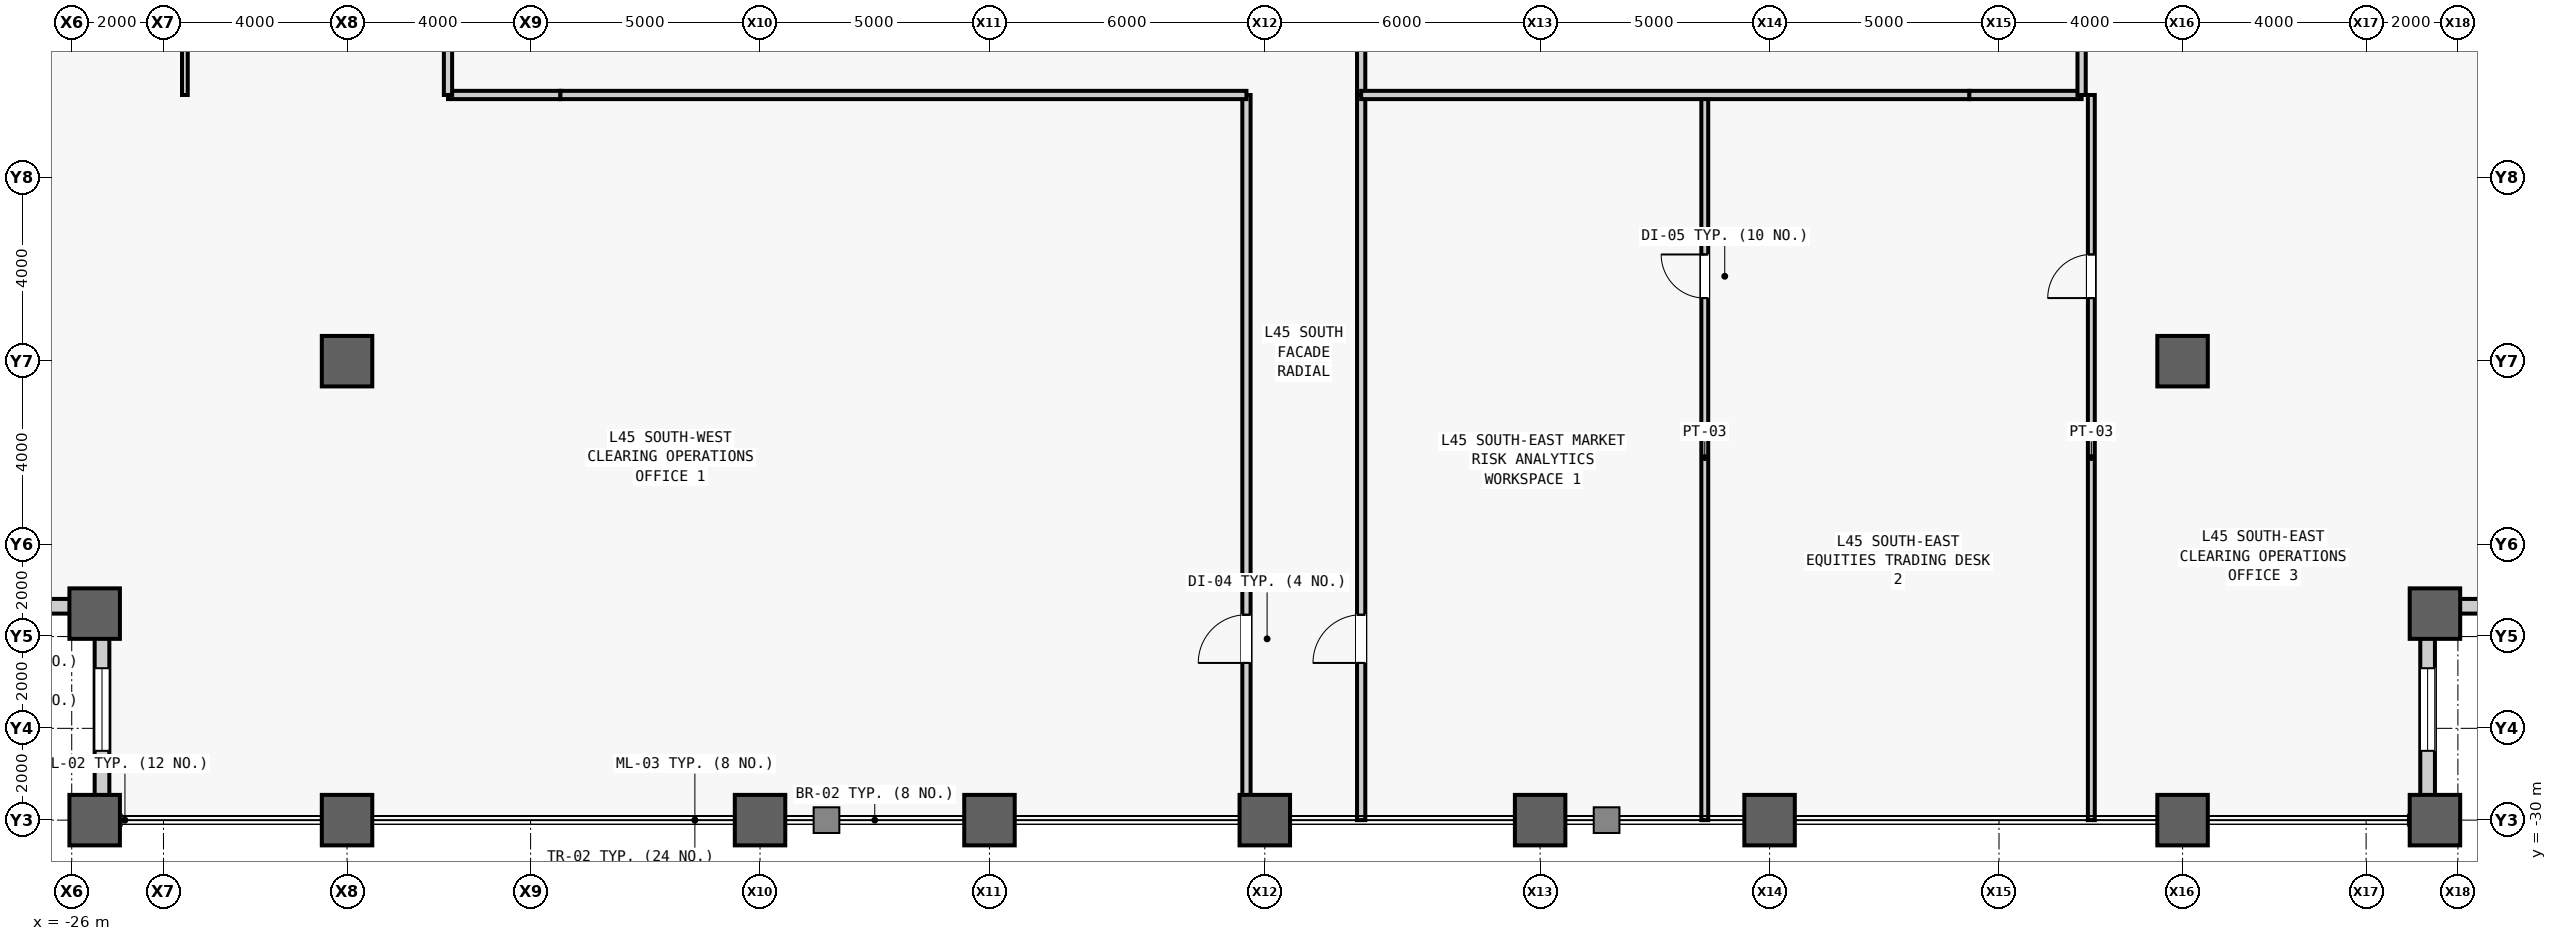
"""IFC4 building model, lengths in metres.
Left out: names, types, materials, properties, quantities, classifications, styles, units other than length and angle.
Written with IfcOpenShell. Run it as: python <this file> out.ifc"""

import sys

from ifc_helpers import new_model, si_unit, direction, frame, frame_2d, origin, origin_2d, place, context, subcontext, project, spatial, rectangle, hollow_rectangle, extrude, source, transform, mapped, element, fill, save


model = new_model("IFC4")
c1 = context("Model", 3, precision=1e-05, world=origin(), true_north=direction((0.0, 1.0)))
c2 = subcontext(c1, "Body", "Model", "MODEL_VIEW")
j1 = project(units=[si_unit("LENGTHUNIT", "METRE"), si_unit("PLANEANGLEUNIT", "RADIAN")], contexts=[c1])
p1 = place(None, origin())
s1 = spatial("IfcSite", under=j1, at=p1, CompositionType="ELEMENT")
p2 = place(p1, origin())
s2 = spatial("IfcBuilding", under=s1, at=p2, CompositionType="ELEMENT")
p3 = place(p2, frame((0.0, 0.0, 195.1)))
s3 = spatial("IfcBuildingStorey", under=s2, at=p3, CompositionType="ELEMENT", Elevation=195.1)
m1 = source(origin(), c2, "Body", "SweptSolid", [
    extrude(hollow_rectangle(XDim=1.1, YDim=1.1, WallThickness=0.06, at=origin_2d()), origin(), (0.0, 0.0, 1.0), 4.0),
])
for number, where, z_axis, x_axis in (
    (1, (-25.5, -30.0, 0.0), (0.0, 0.0, 1.0), (1.0, 0.0, 0.0)),
    (2, (-25.5, -25.5, 0.0), (0.0, 0.0, 1.0), (1.0, 0.0, 0.0)),
    (3, (-20.0, -30.0, 0.0), (0.0, 0.0, 1.0), (1.0, 0.0, 0.0)),
    (4, (-20.0, -20.0, 0.0), (0.0, 0.0, 1.0), (1.0, 0.0, 0.0)),
    (5, (-11.0, -30.0, 0.0), (0.0, 0.0, 1.0), (1.0, 0.0, 0.0)),
    (6, (-6.0, -30.0, 0.0), (0.0, 0.0, 1.0), (1.0, 0.0, 0.0)),
    (7, (0.0, -30.0, 0.0), (0.0, 0.0, 1.0), (1.0, 0.0, 0.0)),
    (8, (6.0, -30.0, 0.0), (0.0, 0.0, 1.0), (1.0, 0.0, 0.0)),
    (9, (11.0, -30.0, 0.0), (0.0, 0.0, 1.0), (1.0, 0.0, 0.0)),
    (10, (20.0, -30.0, 0.0), (0.0, 0.0, 1.0), (1.0, 0.0, 0.0)),
    (11, (20.0, -20.0, 0.0), (0.0, 0.0, 1.0), (1.0, 0.0, 0.0)),
    (12, (25.5, -30.0, 0.0), (0.0, 0.0, 1.0), (1.0, 0.0, 0.0)),
    (13, (25.5, -25.5, 0.0), (0.0, 0.0, 1.0), (1.0, 0.0, 0.0)),
):
    element("IfcColumn", number, at=place(p3, frame(where, z_axis=z_axis, x_axis=x_axis)), inside=s3, PredefinedType="COLUMN", context=c2, shape_type="MappedRepresentation", body=[
        mapped(m1, transform((0.0, 0.0, 0.0), scale=1.0)),
    ])
m2 = source(origin(), c2, "Body", "SweptSolid", [
    extrude(rectangle(XDim=4.18, YDim=0.32, at=frame_2d((2.09, 0.0))), origin(), (0.0, 0.0, 1.0), 3.164),
])
p4 = place(p3, frame((-25.5, -25.34, 0.0), z_axis=(0.0, 0.0, 1.0), x_axis=(-1.0, 0.0, 0.0)))
e14 = element("IfcWall", 14, at=p4, inside=s3, PredefinedType="STANDARD", context=c2, shape_type="MappedRepresentation", body=[
    mapped(m2, transform((0.0, 0.0, 0.0), scale=1.0)),
])
m3 = source(origin(), c2, "Body", "SweptSolid", [
    extrude(rectangle(XDim=1.8, YDim=2.4, at=frame_2d((0.9, 1.2))), frame((0.0, 0.17, 0.0), z_axis=(0.0, -1.0, 0.0), x_axis=(1.0, 0.0, 0.0)), (0.0, 0.0, 1.0), 0.34),
])
p5 = place(p4, frame((1.19, 0.0, 0.5)))
e15 = element("IfcOpeningElement", 15, at=p5, cuts=e14, PredefinedType="OPENING", context=c2, shape_type="MappedRepresentation", body=[
    mapped(m3, transform((0.0, 0.0, 0.0), scale=1.0)),
])
p6 = place(p3, frame((-25.34, -29.68, 0.0), z_axis=(0.0, 0.0, 1.0), x_axis=(0.0, 1.0, 0.0)))
e16 = element("IfcWall", 16, at=p6, inside=s3, PredefinedType="STANDARD", context=c2, shape_type="MappedRepresentation", body=[
    mapped(m2, transform((0.0, 0.0, 0.0), scale=1.0)),
])
p7 = place(p6, frame((1.19, 0.0, 0.5)))
e17 = element("IfcOpeningElement", 17, at=p7, cuts=e16, PredefinedType="OPENING", context=c2, shape_type="MappedRepresentation", body=[
    mapped(m3, transform((0.0, 0.0, 0.0), scale=1.0)),
])
p8 = place(p3, frame((25.34, -29.68, 0.0), z_axis=(0.0, 0.0, 1.0), x_axis=(0.0, 1.0, 0.0)))
e18 = element("IfcWall", 18, at=p8, inside=s3, PredefinedType="STANDARD", context=c2, shape_type="MappedRepresentation", body=[
    mapped(m2, transform((0.0, 0.0, 0.0), scale=1.0)),
])
p9 = place(p8, frame((1.19, 0.0, 0.5)))
e19 = element("IfcOpeningElement", 19, at=p9, cuts=e18, PredefinedType="OPENING", context=c2, shape_type="MappedRepresentation", body=[
    mapped(m3, transform((0.0, 0.0, 0.0), scale=1.0)),
])
p10 = place(p3, frame((25.5, -25.34, 0.0), z_axis=(0.0, 0.0, 1.0), x_axis=(1.0, 0.0, 0.0)))
e20 = element("IfcWall", 20, at=p10, inside=s3, PredefinedType="STANDARD", context=c2, shape_type="MappedRepresentation", body=[
    mapped(m2, transform((0.0, 0.0, 0.0), scale=1.0)),
])
p11 = place(p10, frame((1.19, 0.0, 0.5)))
e21 = element("IfcOpeningElement", 21, at=p11, cuts=e20, PredefinedType="OPENING", context=c2, shape_type="MappedRepresentation", body=[
    mapped(m3, transform((0.0, 0.0, 0.0), scale=1.0)),
])
m4 = source(origin(), c2, "Body", "SweptSolid", [
    extrude(rectangle(XDim=2.45, YDim=0.18, at=frame_2d((1.225, 0.0))), origin(), (0.0, 0.0, 1.0), 3.78),
])
for number, where, z_axis, x_axis in (
    (22, (15.35, -14.2, 0.0), (0.0, 0.0, 1.0), (1.0, 0.0, 0.0)),
    (23, (-17.8, -14.2, 0.0), (0.0, 0.0, 1.0), (1.0, 0.0, 0.0)),
):
    element("IfcWall", number, at=place(p3, frame(where, z_axis=z_axis, x_axis=x_axis)), inside=s3, PredefinedType="PARTITIONING", context=c2, shape_type="MappedRepresentation", body=[
        mapped(m4, transform((0.0, 0.0, 0.0), scale=1.0)),
    ])
m5 = source(origin(), c2, "Body", "SweptSolid", [
    extrude(rectangle(XDim=3.2, YDim=0.18, at=frame_2d((1.6, 0.0))), origin(), (0.0, 0.0, 1.0), 3.78),
])
p12 = place(p3, frame((2.1, -14.2, 0.0), z_axis=(0.0, 0.0, 1.0), x_axis=(0.0, 1.0, 0.0)))
e24 = element("IfcWall", 24, at=p12, inside=s3, PredefinedType="PARTITIONING", context=c2, shape_type="MappedRepresentation", body=[
    mapped(m5, transform((0.0, 0.0, 0.0), scale=1.0)),
])
m6 = source(origin(), c2, "Body", "SweptSolid", [
    extrude(rectangle(XDim=15.8, YDim=0.18, at=frame_2d((7.9, 0.0))), origin(), (0.0, 0.0, 1.0), 3.78),
])
p13 = place(p3, frame((-0.4, -30.0, 0.0), z_axis=(0.0, 0.0, 1.0), x_axis=(0.0, 1.0, 0.0)))
e25 = element("IfcWall", 25, at=p13, inside=s3, PredefinedType="PARTITIONING", context=c2, shape_type="MappedRepresentation", body=[
    mapped(m6, transform((0.0, 0.0, 0.0), scale=1.0)),
])
m7 = source(origin(), c2, "Body", "SweptSolid", [
    extrude(rectangle(XDim=1.05, YDim=2.2, at=frame_2d((0.525, 1.1))), frame((0.0, 0.1, 0.0), z_axis=(0.0, -1.0, 0.0), x_axis=(1.0, 0.0, 0.0)), (0.0, 0.0, 1.0), 0.2),
])
p14 = place(p13, frame((3.425, 0.0, 0.0)))
e26 = element("IfcOpeningElement", 26, at=p14, cuts=e25, PredefinedType="OPENING", context=c2, shape_type="MappedRepresentation", body=[
    mapped(m7, transform((0.0, 0.0, 0.0), scale=1.0)),
])
m8 = source(origin(), c2, "Body", "SweptSolid", [
    extrude(rectangle(XDim=14.95, YDim=0.18, at=frame_2d((7.475, 0.0))), origin(), (0.0, 0.0, 1.0), 3.78),
])
p15 = place(p3, frame((-15.35, -14.2, 0.0), z_axis=(0.0, 0.0, 1.0), x_axis=(1.0, 0.0, 0.0)))
e27 = element("IfcWall", 27, at=p15, inside=s3, PredefinedType="PARTITIONING", context=c2, shape_type="MappedRepresentation", body=[
    mapped(m8, transform((0.0, 0.0, 0.0), scale=1.0)),
])
m9 = source(origin(), c2, "Body", "SweptSolid", [
    extrude(rectangle(XDim=15.8, YDim=0.15, at=frame_2d((7.9, 0.0))), origin(), (0.0, 0.0, 1.0), 3.78),
])
p16 = place(p3, frame((9.588, -30.0, 0.0), z_axis=(0.0, 0.0, 1.0), x_axis=(0.0, 1.0, 0.0)))
e28 = element("IfcWall", 28, at=p16, inside=s3, PredefinedType="PARTITIONING", context=c2, shape_type="MappedRepresentation", body=[
    mapped(m9, transform((0.0, 0.0, 0.0), scale=1.0)),
])
m10 = source(origin(), c2, "Body", "SweptSolid", [
    extrude(rectangle(XDim=0.95, YDim=2.15, at=frame_2d((0.475, 1.075))), frame((0.0, 0.085, 0.0), z_axis=(0.0, -1.0, 0.0), x_axis=(1.0, 0.0, 0.0)), (0.0, 0.0, 1.0), 0.17),
])
p17 = place(p16, frame((11.375, 0.0, 0.0)))
e29 = element("IfcOpeningElement", 29, at=p17, cuts=e28, PredefinedType="OPENING", context=c2, shape_type="MappedRepresentation", body=[
    mapped(m10, transform((0.0, 0.0, 0.0), scale=1.0)),
])
p18 = place(p3, frame((18.012, -30.0, 0.0), z_axis=(0.0, 0.0, 1.0), x_axis=(0.0, 1.0, 0.0)))
e30 = element("IfcWall", 30, at=p18, inside=s3, PredefinedType="PARTITIONING", context=c2, shape_type="MappedRepresentation", body=[
    mapped(m9, transform((0.0, 0.0, 0.0), scale=1.0)),
])
p19 = place(p18, frame((11.375, 0.0, 0.0)))
e31 = element("IfcOpeningElement", 31, at=p19, cuts=e30, PredefinedType="OPENING", context=c2, shape_type="MappedRepresentation", body=[
    mapped(m10, transform((0.0, 0.0, 0.0), scale=1.0)),
])
p20 = place(p3, frame((2.1, -30.0, 0.0), z_axis=(0.0, 0.0, 1.0), x_axis=(0.0, 1.0, 0.0)))
e32 = element("IfcWall", 32, at=p20, inside=s3, PredefinedType="PARTITIONING", context=c2, shape_type="MappedRepresentation", body=[
    mapped(m6, transform((0.0, 0.0, 0.0), scale=1.0)),
])
p21 = place(p20, frame((3.425, 0.0, 0.0)))
e33 = element("IfcOpeningElement", 33, at=p21, cuts=e32, PredefinedType="OPENING", context=c2, shape_type="MappedRepresentation", body=[
    mapped(m7, transform((0.0, 0.0, 0.0), scale=1.0)),
])
m11 = source(origin(), c2, "Body", "SweptSolid", [
    extrude(rectangle(XDim=13.25, YDim=0.18, at=frame_2d((6.625, 0.0))), origin(), (0.0, 0.0, 1.0), 3.78),
])
p22 = place(p3, frame((2.1, -14.2, 0.0), z_axis=(0.0, 0.0, 1.0), x_axis=(1.0, 0.0, 0.0)))
e34 = element("IfcWall", 34, at=p22, inside=s3, PredefinedType="PARTITIONING", context=c2, shape_type="MappedRepresentation", body=[
    mapped(m11, transform((0.0, 0.0, 0.0), scale=1.0)),
])
m12 = source(origin(), c2, "Body", "SweptSolid", [
    extrude(rectangle(XDim=11.15, YDim=0.125, at=frame_2d((5.575, 0.0))), origin(), (0.0, 0.0, 1.0), 3.78),
])
p23 = place(p3, frame((-23.534, -14.2, 0.0), z_axis=(0.0, 0.0, 1.0), x_axis=(0.0, 1.0, 0.0)))
e35 = element("IfcWall", 35, at=p23, inside=s3, PredefinedType="PARTITIONING", context=c2, shape_type="MappedRepresentation", body=[
    mapped(m12, transform((0.0, 0.0, 0.0), scale=1.0)),
])
m13 = source(origin(), c2, "Body", "SweptSolid", [
    extrude(rectangle(XDim=11.15, YDim=0.18, at=frame_2d((5.575, 0.0))), origin(), (0.0, 0.0, 1.0), 3.78),
])
p24 = place(p3, frame((-17.8, -14.2, 0.0), z_axis=(0.0, 0.0, 1.0), x_axis=(0.0, 1.0, 0.0)))
e36 = element("IfcWall", 36, at=p24, inside=s3, PredefinedType="PARTITIONING", context=c2, shape_type="MappedRepresentation", body=[
    mapped(m13, transform((0.0, 0.0, 0.0), scale=1.0)),
])
m14 = source(origin(), c2, "Body", "SweptSolid", [
    extrude(rectangle(XDim=16.85, YDim=0.18, at=frame_2d((8.425, 0.0))), origin(), (0.0, 0.0, 1.0), 3.78),
])
p25 = place(p3, frame((17.8, -14.2, 0.0), z_axis=(0.0, 0.0, 1.0), x_axis=(0.0, 1.0, 0.0)))
e37 = element("IfcWall", 37, at=p25, inside=s3, PredefinedType="PARTITIONING", context=c2, shape_type="MappedRepresentation", body=[
    mapped(m14, transform((0.0, 0.0, 0.0), scale=1.0)),
])
m15 = source(origin(), c2, "Body", "SweptSolid", [
    extrude(rectangle(XDim=1.8, YDim=2.4, at=frame_2d((0.9, 1.2))), frame((0.0, 0.03, 0.0), z_axis=(0.0, -1.0, 0.0), x_axis=(1.0, 0.0, 0.0)), (0.0, 0.0, 1.0), 0.06),
])
p26 = place(p7, origin())
e38 = element("IfcWindow", 38, at=p26, inside=s3, PartitioningType="SINGLE_PANEL", PredefinedType="WINDOW", context=c2, shape_type="MappedRepresentation", body=[
    mapped(m15, transform((0.0, 0.0, 0.0), scale=1.0)),
])
fill(e17, e38)
p27 = place(p9, origin())
e39 = element("IfcWindow", 39, at=p27, inside=s3, PartitioningType="SINGLE_PANEL", PredefinedType="WINDOW", context=c2, shape_type="MappedRepresentation", body=[
    mapped(m15, transform((0.0, 0.0, 0.0), scale=1.0)),
])
fill(e19, e39)
m16 = source(origin(), c2, "Body", "SweptSolid", [
    extrude(rectangle(XDim=1.05, YDim=2.2, at=frame_2d((0.525, 1.1))), frame((0.0, 0.025, 0.0), z_axis=(0.0, -1.0, 0.0), x_axis=(1.0, 0.0, 0.0)), (0.0, 0.0, 1.0), 0.05),
])
p28 = place(p14, origin())
e40 = element("IfcDoor", 40, at=p28, inside=s3, OperationType="SINGLE_SWING_LEFT", PredefinedType="DOOR", context=c2, shape_type="MappedRepresentation", body=[
    mapped(m16, transform((0.0, 0.0, 0.0), scale=1.0)),
])
fill(e26, e40)
m17 = source(origin(), c2, "Body", "SweptSolid", [
    extrude(rectangle(XDim=0.95, YDim=2.15, at=frame_2d((0.475, 1.075))), frame((0.0, 0.025, 0.0), z_axis=(0.0, -1.0, 0.0), x_axis=(1.0, 0.0, 0.0)), (0.0, 0.0, 1.0), 0.05),
])
p29 = place(p17, origin())
e41 = element("IfcDoor", 41, at=p29, inside=s3, OperationType="SINGLE_SWING_RIGHT", PredefinedType="DOOR", context=c2, shape_type="MappedRepresentation", body=[
    mapped(m17, transform((0.0, 0.0, 0.0), scale=1.0)),
])
fill(e29, e41)
p30 = place(p19, origin())
e42 = element("IfcDoor", 42, at=p30, inside=s3, OperationType="SINGLE_SWING_LEFT", PredefinedType="DOOR", context=c2, shape_type="MappedRepresentation", body=[
    mapped(m17, transform((0.0, 0.0, 0.0), scale=1.0)),
])
fill(e31, e42)
p31 = place(p21, origin())
e43 = element("IfcDoor", 43, at=p31, inside=s3, OperationType="SINGLE_SWING_LEFT", PredefinedType="DOOR", context=c2, shape_type="MappedRepresentation", body=[
    mapped(m16, transform((0.0, 0.0, 0.0), scale=1.0)),
])
fill(e33, e43)
save(model, sys.argv[1])
